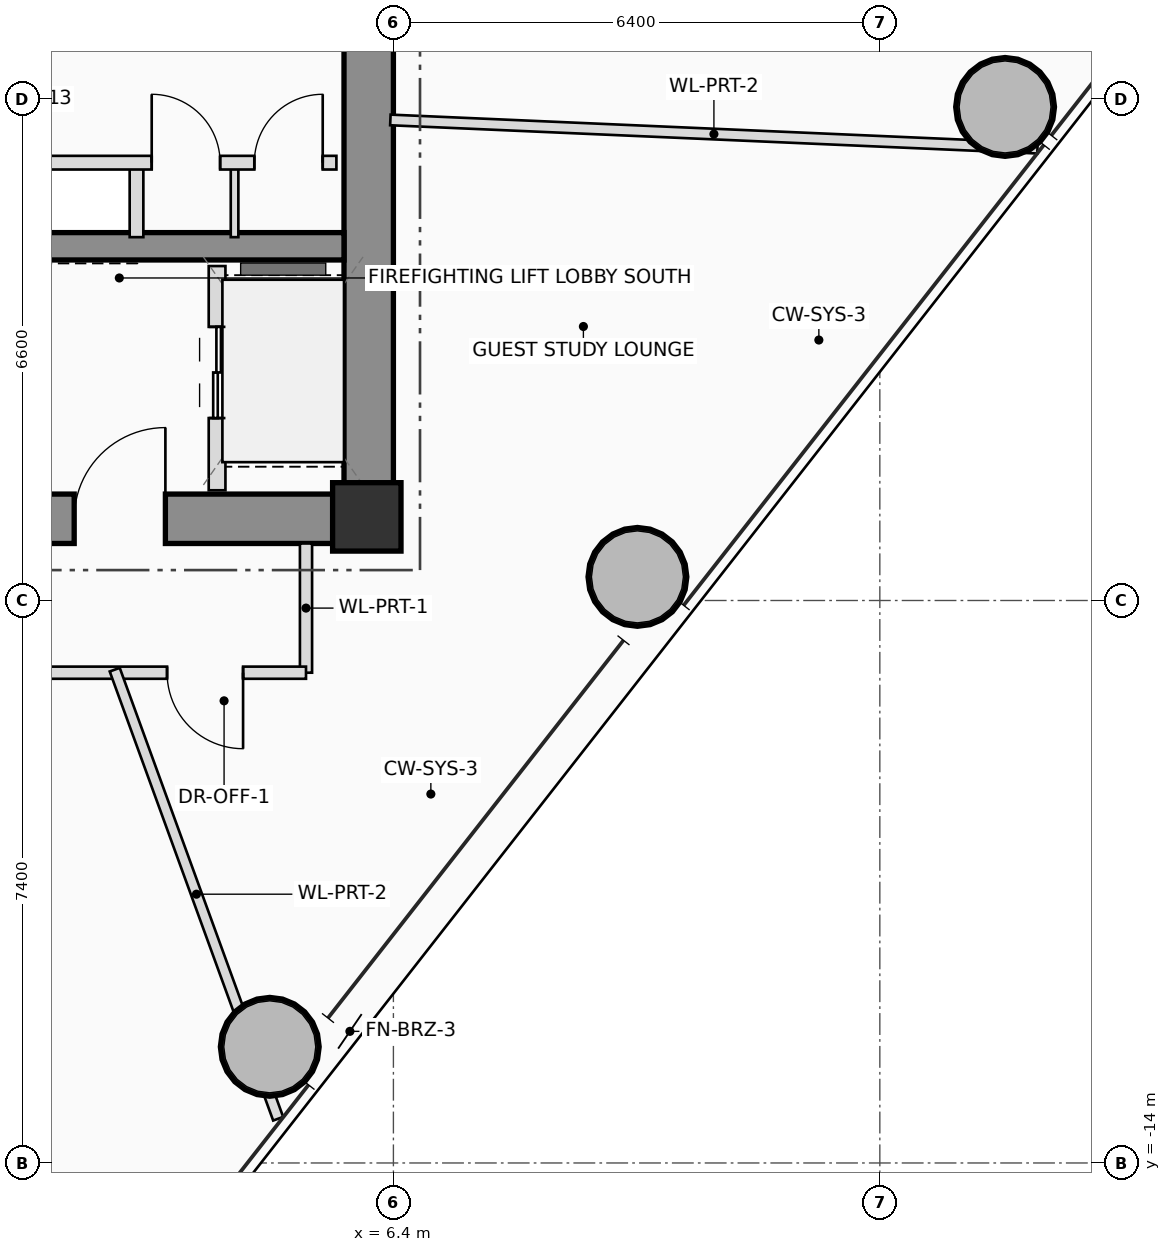
"""IFC4 building model, lengths in metres.
Left out: names, types, materials, properties, quantities, classifications, styles, units other than length and angle.
Written with IfcOpenShell. Run it as: python <this file> out.ifc"""

import sys

from ifc_helpers import new_model, si_unit, direction, frame, frame_2d, origin, origin_2d, place, context, subcontext, project, spatial, rectangle, hollow_circle, extrude, source, transform, mapped, element, fill, save


model = new_model("IFC4")
c1 = context("Model", 3, precision=1e-05, world=origin(), true_north=direction((0.0, 1.0)))
c2 = subcontext(c1, "Body", "Model", "MODEL_VIEW")
j1 = project(units=[si_unit("LENGTHUNIT", "METRE"), si_unit("PLANEANGLEUNIT", "RADIAN")], contexts=[c1])
p1 = place(None, origin())
s1 = spatial("IfcSite", under=j1, at=p1, CompositionType="ELEMENT")
p2 = place(p1, origin())
s2 = spatial("IfcBuilding", under=s1, at=p2, CompositionType="ELEMENT")
p3 = place(p2, frame((0.0, 0.0, 132.95)))
s3 = spatial("IfcBuildingStorey", under=s2, at=p3, CompositionType="ELEMENT", Elevation=132.95)
m1 = source(origin(), c2, "Body", "SweptSolid", [
    extrude(rectangle(XDim=0.9, YDim=0.9, at=origin_2d()), origin(), (0.0, 0.0, 1.0), 3.45),
])
p4 = place(p3, frame((6.05, -5.5, 0.0), z_axis=(0.0, 0.0, 1.0), x_axis=(1.0, 0.0, 0.0)))
e1 = element("IfcColumn", 1, at=p4, inside=s3, PredefinedType="COLUMN", context=c2, shape_type="MappedRepresentation", body=[
    mapped(m1, transform((0.0, 0.0, 0.0), scale=1.0)),
])
p5 = place(p3, frame((-6.4, -5.525, 0.0), z_axis=(0.0, 0.0, 1.0), x_axis=(1.0, 0.0, 0.0)))
e2 = element("IfcWall", 2, at=p5, inside=s3, PredefinedType="SHEAR", context=c2, shape_type="SweptSolid", body=[
    extrude(rectangle(XDim=12.8, YDim=0.65, at=frame_2d((6.4, 0.0))), origin(), (0.0, 0.0, 1.0), 3.45),
])
p6 = place(p5, frame((8.6, 0.0, 0.0)))
e3 = element("IfcOpeningElement", 3, at=p6, cuts=e2, PredefinedType="OPENING", context=c2, shape_type="SweptSolid", body=[
    extrude(rectangle(XDim=1.2, YDim=2.2, at=frame_2d((0.6, 1.1))), frame((0.0, 0.335, 0.0), z_axis=(0.0, -1.0, 0.0), x_axis=(1.0, 0.0, 0.0)), (0.0, 0.0, 1.0), 0.67),
])
p7 = place(p3, frame((6.075, -5.2, 0.0), z_axis=(0.0, 0.0, 1.0), x_axis=(0.0, 1.0, 0.0)))
e4 = element("IfcWall", 4, at=p7, inside=s3, PredefinedType="SHEAR", context=c2, shape_type="SweptSolid", body=[
    extrude(rectangle(XDim=10.4, YDim=0.65, at=frame_2d((5.2, 0.0))), origin(), (0.0, 0.0, 1.0), 3.45),
])
p8 = place(p3, frame((-5.75, -1.94, 0.0), z_axis=(0.0, 0.0, 1.0), x_axis=(1.0, 0.0, 0.0)))
e5 = element("IfcWall", 5, at=p8, inside=s3, PredefinedType="SHEAR", context=c2, shape_type="SweptSolid", body=[
    extrude(rectangle(XDim=11.5, YDim=0.36, at=frame_2d((5.75, 0.0))), origin(), (0.0, 0.0, 1.0), 3.45),
])
m2 = source(origin(), c2, "Body", "SweptSolid", [
    extrude(hollow_circle(Radius=0.65, WallThickness=0.045, at=origin_2d()), origin(), (0.0, 0.0, 1.0), 3.45),
])
for number, where, z_axis, x_axis in (
    (6, (4.773, -12.472, 0.0), (0.0, 0.0, 1.0), (1.0, 0.0, 0.0)),
    (7, (9.611, -6.289, 0.0), (0.0, 0.0, 1.0), (1.0, 0.0, 0.0)),
    (8, (14.448, -0.107, 0.0), (0.0, 0.0, 1.0), (1.0, 0.0, 0.0)),
):
    element("IfcColumn", number, at=place(p3, frame(where, z_axis=z_axis, x_axis=x_axis)), inside=s3, PredefinedType="COLUMN", context=c2, shape_type="MappedRepresentation", body=[
        mapped(m2, transform((0.0, 0.0, 0.0), scale=1.0)),
    ])
p9 = place(p3, frame((4.08, -5.15, 0.0), z_axis=(0.0, 0.0, 1.0), x_axis=(0.0, 1.0, 0.0)))
e9 = element("IfcWall", 9, at=p9, inside=s3, PredefinedType="PLUMBINGWALL", context=c2, shape_type="SweptSolid", body=[
    extrude(rectangle(XDim=2.95, YDim=0.22, at=frame_2d((1.475, 0.0))), origin(), (0.0, 0.0, 1.0), 3.25),
])
p10 = place(p9, frame((0.95, 0.0, 0.0)))
e10 = element("IfcOpeningElement", 10, at=p10, cuts=e9, PredefinedType="OPENING", context=c2, shape_type="SweptSolid", body=[
    extrude(rectangle(XDim=1.2, YDim=2.25, at=frame_2d((0.6, 1.125))), frame((0.0, 0.12, 0.0), z_axis=(0.0, -1.0, 0.0), x_axis=(1.0, 0.0, 0.0)), (0.0, 0.0, 1.0), 0.24),
])
p11 = place(p3, frame((3.02, -1.82, 0.0), z_axis=(0.0, 0.0, 1.0), x_axis=(0.0, 1.0, 0.0)))
e11 = element("IfcWall", 11, at=p11, inside=s3, PredefinedType="PLUMBINGWALL", context=c2, shape_type="SweptSolid", body=[
    extrude(rectangle(XDim=0.98, YDim=0.18, at=frame_2d((0.49, 0.0))), origin(), (0.0, 0.0, 1.0), 3.25),
])
p12 = place(p3, frame((4.31, -1.82, 0.0), z_axis=(0.0, 0.0, 1.0), x_axis=(0.0, 1.0, 0.0)))
e12 = element("IfcWall", 12, at=p12, inside=s3, PredefinedType="PARTITIONING", context=c2, shape_type="SweptSolid", body=[
    extrude(rectangle(XDim=0.98, YDim=0.1, at=frame_2d((0.49, 0.0))), origin(), (0.0, 0.0, 1.0), 3.25),
])
p13 = place(p3, frame((-5.68, -0.84, 0.0), z_axis=(0.0, 0.0, 1.0), x_axis=(1.0, 0.0, 0.0)))
e13 = element("IfcWall", 13, at=p13, inside=s3, PredefinedType="PLUMBINGWALL", context=c2, shape_type="SweptSolid", body=[
    extrude(rectangle(XDim=11.33, YDim=0.18, at=frame_2d((5.665, 0.0))), origin(), (0.0, 0.0, 1.0), 3.25),
])
p14 = place(p13, frame((1.18, 0.0, 0.0)))
e14 = element("IfcOpeningElement", 14, at=p14, cuts=e13, PredefinedType="OPENING", context=c2, shape_type="SweptSolid", body=[
    extrude(rectangle(XDim=0.9, YDim=2.05, at=frame_2d((0.45, 1.025))), frame((0.0, 0.1, 0.0), z_axis=(0.0, -1.0, 0.0), x_axis=(1.0, 0.0, 0.0)), (0.0, 0.0, 1.0), 0.2),
])
p15 = place(p13, frame((3.93, 0.0, 0.0)))
e15 = element("IfcOpeningElement", 15, at=p15, cuts=e13, PredefinedType="OPENING", context=c2, shape_type="SweptSolid", body=[
    extrude(rectangle(XDim=1.1, YDim=2.2, at=frame_2d((0.55, 1.1))), frame((0.0, 0.1, 0.0), z_axis=(0.0, -1.0, 0.0), x_axis=(1.0, 0.0, 0.0)), (0.0, 0.0, 1.0), 0.2),
])
p16 = place(p13, frame((5.63, 0.0, 0.0)))
e16 = element("IfcOpeningElement", 16, at=p16, cuts=e13, PredefinedType="OPENING", context=c2, shape_type="SweptSolid", body=[
    extrude(rectangle(XDim=1.1, YDim=2.2, at=frame_2d((0.55, 1.1))), frame((0.0, 0.1, 0.0), z_axis=(0.0, -1.0, 0.0), x_axis=(1.0, 0.0, 0.0)), (0.0, 0.0, 1.0), 0.2),
])
p17 = place(p13, frame((8.9, 0.0, 0.0)))
e17 = element("IfcOpeningElement", 17, at=p17, cuts=e13, PredefinedType="OPENING", context=c2, shape_type="SweptSolid", body=[
    extrude(rectangle(XDim=0.9, YDim=2.05, at=frame_2d((0.45, 1.025))), frame((0.0, 0.1, 0.0), z_axis=(0.0, -1.0, 0.0), x_axis=(1.0, 0.0, 0.0)), (0.0, 0.0, 1.0), 0.2),
])
p18 = place(p13, frame((10.25, 0.0, 0.0)))
e18 = element("IfcOpeningElement", 18, at=p18, cuts=e13, PredefinedType="OPENING", context=c2, shape_type="SweptSolid", body=[
    extrude(rectangle(XDim=0.9, YDim=2.05, at=frame_2d((0.45, 1.025))), frame((0.0, 0.1, 0.0), z_axis=(0.0, -1.0, 0.0), x_axis=(1.0, 0.0, 0.0)), (0.0, 0.0, 1.0), 0.2),
])
p19 = place(p3, frame((5.25, -5.85, 0.0), z_axis=(0.0, 0.0, 1.0), x_axis=(0.0, -1.0, 0.0)))
e19 = element("IfcWall", 19, at=p19, inside=s3, PredefinedType="PARTITIONING", context=c2, shape_type="SweptSolid", body=[
    extrude(rectangle(XDim=1.7, YDim=0.16, at=frame_2d((0.85, 0.0))), origin(), (0.0, 0.0, 1.0), 3.25),
])
p20 = place(p3, frame((5.25, -7.55, 0.0), z_axis=(0.0, 0.0, 1.0), x_axis=(-1.0, 0.0, 0.0)))
e20 = element("IfcWall", 20, at=p20, inside=s3, PredefinedType="PARTITIONING", context=c2, shape_type="SweptSolid", body=[
    extrude(rectangle(XDim=11.61, YDim=0.16, at=frame_2d((5.805, 0.0))), origin(), (0.0, 0.0, 1.0), 2.605),
])
p21 = place(p20, frame((0.828, 0.0, 0.0)))
e21 = element("IfcOpeningElement", 21, at=p21, cuts=e20, PredefinedType="OPENING", context=c2, shape_type="SweptSolid", body=[
    extrude(rectangle(XDim=1.0, YDim=2.25, at=frame_2d((0.5, 1.125))), frame((0.0, 0.09, 0.0), z_axis=(0.0, -1.0, 0.0), x_axis=(1.0, 0.0, 0.0)), (0.0, 0.0, 1.0), 0.18),
])
p22 = place(p3, frame((6.36, -0.278, 0.0), z_axis=(0.0, 0.0, 1.0), x_axis=(0.999047707238, -0.043631166178, 0.0)))
e22 = element("IfcWall", 22, at=p22, inside=s3, PredefinedType="PARTITIONING", context=c2, shape_type="SweptSolid", body=[
    extrude(rectangle(XDim=8.522, YDim=0.14, at=frame_2d((4.261, 0.0))), origin(), (0.0, 0.0, 1.0), 2.605),
])
p23 = place(p3, frame((2.733, -7.51, 0.0), z_axis=(0.0, 0.0, 1.0), x_axis=(0.342029891784, -0.93968907258, 0.0)))
e23 = element("IfcWall", 23, at=p23, inside=s3, PredefinedType="PARTITIONING", context=c2, shape_type="SweptSolid", body=[
    extrude(rectangle(XDim=6.287, YDim=0.14, at=frame_2d((3.144, 0.0))), origin(), (0.0, 0.0, 1.0), 2.805),
])
p24 = place(p6, origin())
e24 = element("IfcDoor", 24, at=p24, inside=s3, OperationType="SINGLE_SWING_RIGHT", PredefinedType="DOOR", context=c2, shape_type="SweptSolid", body=[
    extrude(rectangle(XDim=1.2, YDim=2.2, at=frame_2d((0.6, 1.1))), frame((0.0, 0.025, 0.0), z_axis=(0.0, -1.0, 0.0), x_axis=(1.0, 0.0, 0.0)), (0.0, 0.0, 1.0), 0.05),
])
fill(e3, e24)
p25 = place(p10, origin())
e25 = element("IfcDoor", 25, at=p25, inside=s3, OperationType="DOUBLE_DOOR_SLIDING", PredefinedType="DOOR", context=c2, shape_type="SweptSolid", body=[
    extrude(rectangle(XDim=1.2, YDim=2.25, at=frame_2d((0.6, 1.125))), frame((0.0, 0.025, 0.0), z_axis=(0.0, -1.0, 0.0), x_axis=(1.0, 0.0, 0.0)), (0.0, 0.0, 1.0), 0.05),
])
fill(e10, e25)
p26 = place(p17, origin())
e26 = element("IfcDoor", 26, at=p26, inside=s3, OperationType="SINGLE_SWING_LEFT", PredefinedType="DOOR", context=c2, shape_type="SweptSolid", body=[
    extrude(rectangle(XDim=0.9, YDim=2.05, at=frame_2d((0.45, 1.025))), frame((0.0, 0.025, 0.0), z_axis=(0.0, -1.0, 0.0), x_axis=(1.0, 0.0, 0.0)), (0.0, 0.0, 1.0), 0.05),
])
fill(e17, e26)
p27 = place(p18, origin())
e27 = element("IfcDoor", 27, at=p27, inside=s3, OperationType="SINGLE_SWING_RIGHT", PredefinedType="DOOR", context=c2, shape_type="SweptSolid", body=[
    extrude(rectangle(XDim=0.9, YDim=2.05, at=frame_2d((0.45, 1.025))), frame((0.0, 0.025, 0.0), z_axis=(0.0, -1.0, 0.0), x_axis=(1.0, 0.0, 0.0)), (0.0, 0.0, 1.0), 0.05),
])
fill(e18, e27)
p28 = place(p21, origin())
e28 = element("IfcDoor", 28, at=p28, inside=s3, OperationType="SINGLE_SWING_LEFT", PredefinedType="DOOR", context=c2, shape_type="SweptSolid", body=[
    extrude(rectangle(XDim=1.0, YDim=2.25, at=frame_2d((0.5, 1.125))), frame((0.0, 0.025, 0.0), z_axis=(0.0, -1.0, 0.0), x_axis=(1.0, 0.0, 0.0)), (0.0, 0.0, 1.0), 0.05),
])
fill(e21, e28)
save(model, sys.argv[1])
